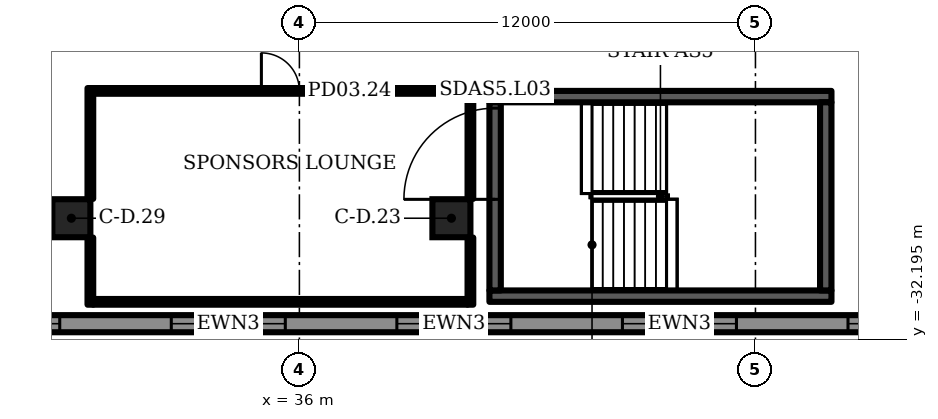
"""IFC4 building model, lengths in metres.
Left out: names, types, materials, properties, quantities, classifications, styles, units other than length and angle.
Written with IfcOpenShell. Run it as: python <this file> out.ifc"""

import sys

from ifc_helpers import new_model, si_unit, direction, frame, frame_2d, origin, origin_2d, place, context, subcontext, project, spatial, rectangle, extrude, element, fill, save


model = new_model("IFC4")
c1 = context("Model", 3, precision=1e-05, world=origin(), true_north=direction((0.0, 1.0)))
c2 = subcontext(c1, "Body", "Model", "MODEL_VIEW")
j1 = project(units=[si_unit("LENGTHUNIT", "METRE"), si_unit("PLANEANGLEUNIT", "RADIAN")], contexts=[c1])
p1 = place(None, origin())
s1 = spatial("IfcSite", under=j1, at=p1, CompositionType="ELEMENT")
p2 = place(p1, origin())
s2 = spatial("IfcBuilding", under=s1, at=p2, CompositionType="ELEMENT")
p3 = place(p2, frame((0.0, 0.0, 21.5)))
s3 = spatial("IfcBuildingStorey", under=s2, at=p3, CompositionType="ELEMENT", Elevation=21.5)
for number, where, z_axis, x_axis in (
    (1, (40.0, -29.0, 0.0), (0.0, 0.0, 1.0), (1.0, 0.0, 0.0)),
    (2, (30.0, -29.0, 0.0), (0.0, 0.0, 1.0), (1.0, 0.0, 0.0)),
):
    element("IfcColumn", number, at=place(p3, frame(where, z_axis=z_axis, x_axis=x_axis)), inside=s3, PredefinedType="COLUMN", context=c2, shape_type="SweptSolid", body=[
        extrude(rectangle(XDim=1.0, YDim=1.0, at=origin_2d()), origin(), (0.0, 0.0, 1.0), 6.0),
    ])
p4 = place(p3, frame((-4.45, -31.775, 0.0), z_axis=(0.0, 0.0, 1.0), x_axis=(1.0, 0.0, 0.0)))
e3 = element("IfcWall", 3, at=p4, inside=s3, PredefinedType="SOLIDWALL", context=c2, shape_type="SweptSolid", body=[
    extrude(rectangle(XDim=100.9, YDim=0.45, at=frame_2d((50.45, 0.0))), origin(), (0.0, 0.0, 1.0), 5.7),
])
p5 = place(p4, frame((1.468, 0.0, 1.0)))
e4 = element("IfcOpeningElement", 4, at=p5, cuts=e3, PredefinedType="OPENING", context=c2, shape_type="SweptSolid", body=[
    extrude(rectangle(XDim=3.0, YDim=3.7, at=frame_2d((1.5, 1.85))), frame((0.0, 0.235, 0.0), z_axis=(0.0, -1.0, 0.0), x_axis=(1.0, 0.0, 0.0)), (0.0, 0.0, 1.0), 0.47),
])
p6 = place(p4, frame((7.403, 0.0, 1.0)))
e5 = element("IfcOpeningElement", 5, at=p6, cuts=e3, PredefinedType="OPENING", context=c2, shape_type="SweptSolid", body=[
    extrude(rectangle(XDim=3.0, YDim=3.7, at=frame_2d((1.5, 1.85))), frame((0.0, 0.235, 0.0), z_axis=(0.0, -1.0, 0.0), x_axis=(1.0, 0.0, 0.0)), (0.0, 0.0, 1.0), 0.47),
])
p7 = place(p4, frame((13.338, 0.0, 1.0)))
e6 = element("IfcOpeningElement", 6, at=p7, cuts=e3, PredefinedType="OPENING", context=c2, shape_type="SweptSolid", body=[
    extrude(rectangle(XDim=3.0, YDim=3.7, at=frame_2d((1.5, 1.85))), frame((0.0, 0.235, 0.0), z_axis=(0.0, -1.0, 0.0), x_axis=(1.0, 0.0, 0.0)), (0.0, 0.0, 1.0), 0.47),
])
p8 = place(p4, frame((19.273, 0.0, 1.0)))
e7 = element("IfcOpeningElement", 7, at=p8, cuts=e3, PredefinedType="OPENING", context=c2, shape_type="SweptSolid", body=[
    extrude(rectangle(XDim=3.0, YDim=3.7, at=frame_2d((1.5, 1.85))), frame((0.0, 0.235, 0.0), z_axis=(0.0, -1.0, 0.0), x_axis=(1.0, 0.0, 0.0)), (0.0, 0.0, 1.0), 0.47),
])
p9 = place(p4, frame((25.209, 0.0, 1.0)))
e8 = element("IfcOpeningElement", 8, at=p9, cuts=e3, PredefinedType="OPENING", context=c2, shape_type="SweptSolid", body=[
    extrude(rectangle(XDim=3.0, YDim=3.7, at=frame_2d((1.5, 1.85))), frame((0.0, 0.235, 0.0), z_axis=(0.0, -1.0, 0.0), x_axis=(1.0, 0.0, 0.0)), (0.0, 0.0, 1.0), 0.47),
])
p10 = place(p4, frame((31.144, 0.0, 1.0)))
e9 = element("IfcOpeningElement", 9, at=p10, cuts=e3, PredefinedType="OPENING", context=c2, shape_type="SweptSolid", body=[
    extrude(rectangle(XDim=3.0, YDim=3.7, at=frame_2d((1.5, 1.85))), frame((0.0, 0.235, 0.0), z_axis=(0.0, -1.0, 0.0), x_axis=(1.0, 0.0, 0.0)), (0.0, 0.0, 1.0), 0.47),
])
p11 = place(p4, frame((37.079, 0.0, 1.0)))
e10 = element("IfcOpeningElement", 10, at=p11, cuts=e3, PredefinedType="OPENING", context=c2, shape_type="SweptSolid", body=[
    extrude(rectangle(XDim=3.0, YDim=3.7, at=frame_2d((1.5, 1.85))), frame((0.0, 0.235, 0.0), z_axis=(0.0, -1.0, 0.0), x_axis=(1.0, 0.0, 0.0)), (0.0, 0.0, 1.0), 0.47),
])
p12 = place(p4, frame((43.015, 0.0, 1.0)))
e11 = element("IfcOpeningElement", 11, at=p12, cuts=e3, PredefinedType="OPENING", context=c2, shape_type="SweptSolid", body=[
    extrude(rectangle(XDim=3.0, YDim=3.7, at=frame_2d((1.5, 1.85))), frame((0.0, 0.235, 0.0), z_axis=(0.0, -1.0, 0.0), x_axis=(1.0, 0.0, 0.0)), (0.0, 0.0, 1.0), 0.47),
])
p13 = place(p4, frame((48.95, 0.0, 1.0)))
e12 = element("IfcOpeningElement", 12, at=p13, cuts=e3, PredefinedType="OPENING", context=c2, shape_type="SweptSolid", body=[
    extrude(rectangle(XDim=3.0, YDim=3.7, at=frame_2d((1.5, 1.85))), frame((0.0, 0.235, 0.0), z_axis=(0.0, -1.0, 0.0), x_axis=(1.0, 0.0, 0.0)), (0.0, 0.0, 1.0), 0.47),
])
p14 = place(p4, frame((54.885, 0.0, 1.0)))
e13 = element("IfcOpeningElement", 13, at=p14, cuts=e3, PredefinedType="OPENING", context=c2, shape_type="SweptSolid", body=[
    extrude(rectangle(XDim=3.0, YDim=3.7, at=frame_2d((1.5, 1.85))), frame((0.0, 0.235, 0.0), z_axis=(0.0, -1.0, 0.0), x_axis=(1.0, 0.0, 0.0)), (0.0, 0.0, 1.0), 0.47),
])
p15 = place(p4, frame((60.821, 0.0, 1.0)))
e14 = element("IfcOpeningElement", 14, at=p15, cuts=e3, PredefinedType="OPENING", context=c2, shape_type="SweptSolid", body=[
    extrude(rectangle(XDim=3.0, YDim=3.7, at=frame_2d((1.5, 1.85))), frame((0.0, 0.235, 0.0), z_axis=(0.0, -1.0, 0.0), x_axis=(1.0, 0.0, 0.0)), (0.0, 0.0, 1.0), 0.47),
])
p16 = place(p4, frame((66.756, 0.0, 1.0)))
e15 = element("IfcOpeningElement", 15, at=p16, cuts=e3, PredefinedType="OPENING", context=c2, shape_type="SweptSolid", body=[
    extrude(rectangle(XDim=3.0, YDim=3.7, at=frame_2d((1.5, 1.85))), frame((0.0, 0.235, 0.0), z_axis=(0.0, -1.0, 0.0), x_axis=(1.0, 0.0, 0.0)), (0.0, 0.0, 1.0), 0.47),
])
p17 = place(p4, frame((72.691, 0.0, 1.0)))
e16 = element("IfcOpeningElement", 16, at=p17, cuts=e3, PredefinedType="OPENING", context=c2, shape_type="SweptSolid", body=[
    extrude(rectangle(XDim=3.0, YDim=3.7, at=frame_2d((1.5, 1.85))), frame((0.0, 0.235, 0.0), z_axis=(0.0, -1.0, 0.0), x_axis=(1.0, 0.0, 0.0)), (0.0, 0.0, 1.0), 0.47),
])
p18 = place(p4, frame((78.626, 0.0, 1.0)))
e17 = element("IfcOpeningElement", 17, at=p18, cuts=e3, PredefinedType="OPENING", context=c2, shape_type="SweptSolid", body=[
    extrude(rectangle(XDim=3.0, YDim=3.7, at=frame_2d((1.5, 1.85))), frame((0.0, 0.235, 0.0), z_axis=(0.0, -1.0, 0.0), x_axis=(1.0, 0.0, 0.0)), (0.0, 0.0, 1.0), 0.47),
])
p19 = place(p4, frame((84.562, 0.0, 1.0)))
e18 = element("IfcOpeningElement", 18, at=p19, cuts=e3, PredefinedType="OPENING", context=c2, shape_type="SweptSolid", body=[
    extrude(rectangle(XDim=3.0, YDim=3.7, at=frame_2d((1.5, 1.85))), frame((0.0, 0.235, 0.0), z_axis=(0.0, -1.0, 0.0), x_axis=(1.0, 0.0, 0.0)), (0.0, 0.0, 1.0), 0.47),
])
p20 = place(p4, frame((90.497, 0.0, 1.0)))
e19 = element("IfcOpeningElement", 19, at=p20, cuts=e3, PredefinedType="OPENING", context=c2, shape_type="SweptSolid", body=[
    extrude(rectangle(XDim=3.0, YDim=3.7, at=frame_2d((1.5, 1.85))), frame((0.0, 0.235, 0.0), z_axis=(0.0, -1.0, 0.0), x_axis=(1.0, 0.0, 0.0)), (0.0, 0.0, 1.0), 0.47),
])
p21 = place(p4, frame((96.432, 0.0, 1.0)))
e20 = element("IfcOpeningElement", 20, at=p21, cuts=e3, PredefinedType="OPENING", context=c2, shape_type="SweptSolid", body=[
    extrude(rectangle(XDim=3.0, YDim=3.7, at=frame_2d((1.5, 1.85))), frame((0.0, 0.235, 0.0), z_axis=(0.0, -1.0, 0.0), x_axis=(1.0, 0.0, 0.0)), (0.0, 0.0, 1.0), 0.47),
])
p22 = place(p3, frame((30.575, -31.2, 0.0), z_axis=(0.0, 0.0, 1.0), x_axis=(1.0, 0.0, 0.0)))
e21 = element("IfcWall", 21, at=p22, inside=s3, PredefinedType="PARTITIONING", context=c2, shape_type="SweptSolid", body=[
    extrude(rectangle(XDim=9.85, YDim=0.15, at=frame_2d((4.925, 0.0))), origin(), (0.0, 0.0, 1.0), 5.7),
])
p23 = place(p3, frame((40.5, -31.275, 0.0), z_axis=(0.0, 0.0, 1.0), x_axis=(0.0, 1.0, 0.0)))
e22 = element("IfcWall", 22, at=p23, inside=s3, PredefinedType="PARTITIONING", context=c2, shape_type="SweptSolid", body=[
    extrude(rectangle(XDim=1.765, YDim=0.15, at=frame_2d((0.882, 0.0))), origin(), (0.0, 0.0, 1.0), 5.7),
])
p24 = place(p3, frame((40.5, -28.49, 0.0), z_axis=(0.0, 0.0, 1.0), x_axis=(0.0, 1.0, 0.0)))
e23 = element("IfcWall", 23, at=p24, inside=s3, PredefinedType="PARTITIONING", context=c2, shape_type="SweptSolid", body=[
    extrude(rectangle(XDim=2.915, YDim=0.15, at=frame_2d((1.458, 0.0))), origin(), (0.0, 0.0, 1.0), 5.7),
])
p25 = place(p3, frame((30.575, -25.65, 0.0), z_axis=(0.0, 0.0, 1.0), x_axis=(1.0, 0.0, 0.0)))
e24 = element("IfcWall", 24, at=p25, inside=s3, PredefinedType="PARTITIONING", context=c2, shape_type="SweptSolid", body=[
    extrude(rectangle(XDim=9.85, YDim=0.15, at=frame_2d((4.925, 0.0))), origin(), (0.0, 0.0, 1.0), 5.7),
])
p26 = place(p25, frame((4.425, 0.0, 0.0)))
e25 = element("IfcOpeningElement", 25, at=p26, cuts=e24, PredefinedType="OPENING", context=c2, shape_type="SweptSolid", body=[
    extrude(rectangle(XDim=1.0, YDim=2.1, at=frame_2d((0.5, 1.05))), frame((0.0, 0.085, 0.0), z_axis=(0.0, -1.0, 0.0), x_axis=(1.0, 0.0, 0.0)), (0.0, 0.0, 1.0), 0.17),
])
p27 = place(p3, frame((30.5, -31.275, 0.0), z_axis=(0.0, 0.0, 1.0), x_axis=(0.0, 1.0, 0.0)))
e26 = element("IfcWall", 26, at=p27, inside=s3, PredefinedType="PARTITIONING", context=c2, shape_type="SweptSolid", body=[
    extrude(rectangle(XDim=1.765, YDim=0.15, at=frame_2d((0.882, 0.0))), origin(), (0.0, 0.0, 1.0), 5.7),
])
p28 = place(p3, frame((30.5, -28.49, 0.0), z_axis=(0.0, 0.0, 1.0), x_axis=(0.0, 1.0, 0.0)))
e27 = element("IfcWall", 27, at=p28, inside=s3, PredefinedType="PARTITIONING", context=c2, shape_type="SweptSolid", body=[
    extrude(rectangle(XDim=2.915, YDim=0.15, at=frame_2d((1.458, 0.0))), origin(), (0.0, 0.0, 1.0), 5.7),
])
for number, where, z_axis, x_axis in (
    (28, (41.0, -31.05, 0.0), (0.0, 0.0, 1.0), (1.0, 0.0, 0.0)),
    (29, (41.0, -25.8, 0.0), (0.0, 0.0, 1.0), (1.0, 0.0, 0.0)),
):
    element("IfcWall", number, at=place(p3, frame(where, z_axis=z_axis, x_axis=x_axis)), inside=s3, PredefinedType="SHEAR", context=c2, shape_type="SweptSolid", body=[
        extrude(rectangle(XDim=9.0, YDim=0.3, at=frame_2d((4.5, 0.0))), origin(), (0.0, 0.0, 1.0), 5.7),
    ])
p29 = place(p3, frame((41.15, -30.9, 0.0), z_axis=(0.0, 0.0, 1.0), x_axis=(0.0, 1.0, 0.0)))
e30 = element("IfcWall", 30, at=p29, inside=s3, PredefinedType="SHEAR", context=c2, shape_type="SweptSolid", body=[
    extrude(rectangle(XDim=4.95, YDim=0.3, at=frame_2d((2.475, 0.0))), origin(), (0.0, 0.0, 1.0), 5.7),
])
p30 = place(p29, frame((2.397, 0.0, 0.0)))
e31 = element("IfcOpeningElement", 31, at=p30, cuts=e30, PredefinedType="OPENING", context=c2, shape_type="SweptSolid", body=[
    extrude(rectangle(XDim=2.4, YDim=2.1, at=frame_2d((1.2, 1.05))), frame((0.0, 0.16, 0.0), z_axis=(0.0, -1.0, 0.0), x_axis=(1.0, 0.0, 0.0)), (0.0, 0.0, 1.0), 0.32),
])
p31 = place(p3, frame((49.85, -30.9, 0.0), z_axis=(0.0, 0.0, 1.0), x_axis=(0.0, 1.0, 0.0)))
e32 = element("IfcWall", 32, at=p31, inside=s3, PredefinedType="SHEAR", context=c2, shape_type="SweptSolid", body=[
    extrude(rectangle(XDim=4.95, YDim=0.3, at=frame_2d((2.475, 0.0))), origin(), (0.0, 0.0, 1.0), 5.7),
])
p32 = place(p10, origin())
e33 = element("IfcWindow", 33, at=p32, inside=s3, PartitioningType="SINGLE_PANEL", PredefinedType="WINDOW", context=c2, shape_type="SweptSolid", body=[
    extrude(rectangle(XDim=3.0, YDim=3.7, at=frame_2d((1.5, 1.85))), frame((0.0, 0.105, 0.0), z_axis=(0.0, -1.0, 0.0), x_axis=(1.0, 0.0, 0.0)), (0.0, 0.0, 1.0), 0.06),
])
fill(e9, e33)
p33 = place(p11, origin())
e34 = element("IfcWindow", 34, at=p33, inside=s3, PartitioningType="SINGLE_PANEL", PredefinedType="WINDOW", context=c2, shape_type="SweptSolid", body=[
    extrude(rectangle(XDim=3.0, YDim=3.7, at=frame_2d((1.5, 1.85))), frame((0.0, 0.105, 0.0), z_axis=(0.0, -1.0, 0.0), x_axis=(1.0, 0.0, 0.0)), (0.0, 0.0, 1.0), 0.06),
])
fill(e10, e34)
p34 = place(p12, origin())
e35 = element("IfcWindow", 35, at=p34, inside=s3, PartitioningType="SINGLE_PANEL", PredefinedType="WINDOW", context=c2, shape_type="SweptSolid", body=[
    extrude(rectangle(XDim=3.0, YDim=3.7, at=frame_2d((1.5, 1.85))), frame((0.0, 0.105, 0.0), z_axis=(0.0, -1.0, 0.0), x_axis=(1.0, 0.0, 0.0)), (0.0, 0.0, 1.0), 0.06),
])
fill(e11, e35)
p35 = place(p13, origin())
e36 = element("IfcWindow", 36, at=p35, inside=s3, PartitioningType="SINGLE_PANEL", PredefinedType="WINDOW", context=c2, shape_type="SweptSolid", body=[
    extrude(rectangle(XDim=3.0, YDim=3.7, at=frame_2d((1.5, 1.85))), frame((0.0, 0.105, 0.0), z_axis=(0.0, -1.0, 0.0), x_axis=(1.0, 0.0, 0.0)), (0.0, 0.0, 1.0), 0.06),
])
fill(e12, e36)
p36 = place(p14, origin())
e37 = element("IfcWindow", 37, at=p36, inside=s3, PartitioningType="SINGLE_PANEL", PredefinedType="WINDOW", context=c2, shape_type="SweptSolid", body=[
    extrude(rectangle(XDim=3.0, YDim=3.7, at=frame_2d((1.5, 1.85))), frame((0.0, 0.105, 0.0), z_axis=(0.0, -1.0, 0.0), x_axis=(1.0, 0.0, 0.0)), (0.0, 0.0, 1.0), 0.06),
])
fill(e13, e37)
p37 = place(p26, origin())
e38 = element("IfcDoor", 38, at=p37, inside=s3, OperationType="SINGLE_SWING_LEFT", PredefinedType="DOOR", context=c2, shape_type="SweptSolid", body=[
    extrude(rectangle(XDim=1.0, YDim=2.1, at=frame_2d((0.5, 1.05))), frame((0.0, 0.025, 0.0), z_axis=(0.0, -1.0, 0.0), x_axis=(1.0, 0.0, 0.0)), (0.0, 0.0, 1.0), 0.05),
])
fill(e25, e38)
p38 = place(p30, origin())
e39 = element("IfcDoor", 39, at=p38, inside=s3, OperationType="DOUBLE_DOOR_SINGLE_SWING", PredefinedType="DOOR", context=c2, shape_type="SweptSolid", body=[
    extrude(rectangle(XDim=2.4, YDim=2.1, at=frame_2d((1.2, 1.05))), frame((0.0, 0.025, 0.0), z_axis=(0.0, -1.0, 0.0), x_axis=(1.0, 0.0, 0.0)), (0.0, 0.0, 1.0), 0.05),
])
fill(e31, e39)
save(model, sys.argv[1])
